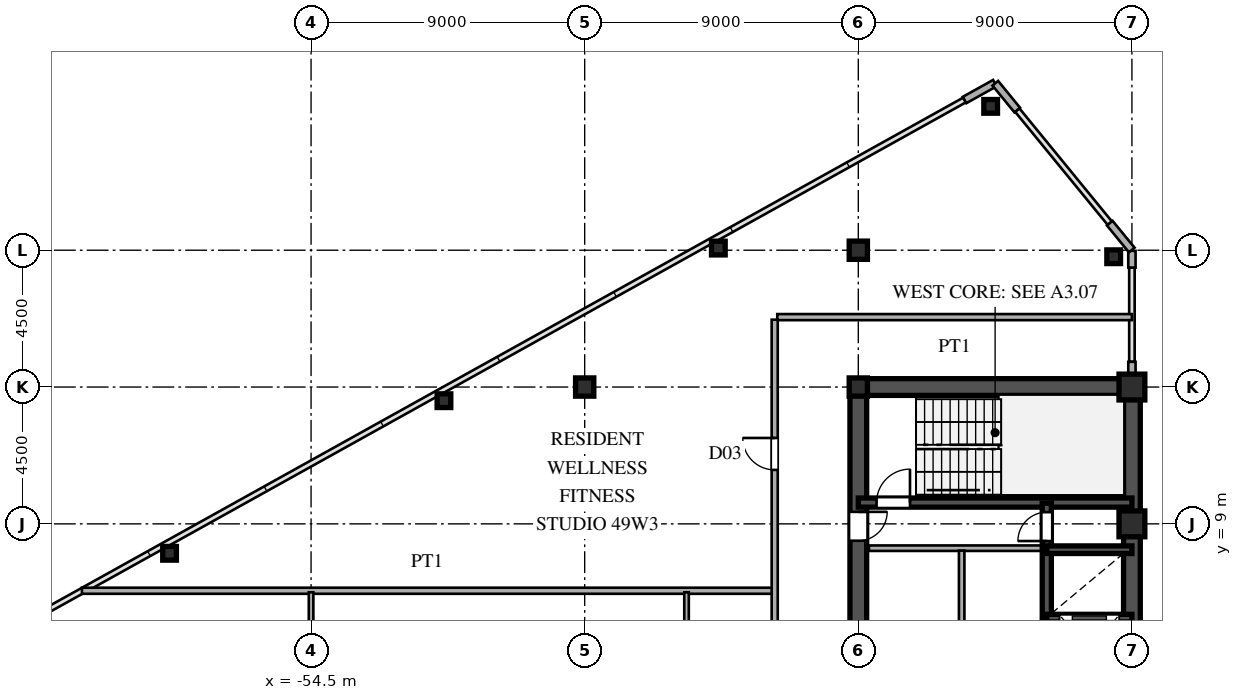
"""IFC4 building model, lengths in metres.
Left out: names, types, materials, properties, quantities, classifications, styles, units other than length and angle.
Written with IfcOpenShell. Run it as: python <this file> out.ifc"""

import sys

from ifc_helpers import new_model, si_unit, direction, frame, frame_2d, origin, origin_2d, place, context, subcontext, project, spatial, rectangle, hollow_rectangle, i_section, extrude, source, transform, mapped, element, fill, save


model = new_model("IFC4")
c1 = context("Model", 3, precision=1e-05, world=origin(), true_north=direction((0.0, 1.0)))
c2 = subcontext(c1, "Body", "Model", "MODEL_VIEW")
j1 = project(units=[si_unit("LENGTHUNIT", "METRE"), si_unit("PLANEANGLEUNIT", "RADIAN")], contexts=[c1])
p1 = place(None, origin())
s1 = spatial("IfcSite", under=j1, at=p1, CompositionType="ELEMENT")
p2 = place(p1, origin())
s2 = spatial("IfcBuilding", under=s1, at=p2, CompositionType="ELEMENT")
p3 = place(p2, frame((0.0, 0.0, 185.1)))
s3 = spatial("IfcBuildingStorey", under=s2, at=p3, CompositionType="ELEMENT", Elevation=185.1)
m1 = source(origin(), c2, "Body", "SweptSolid", [
    extrude(hollow_rectangle(XDim=0.85, YDim=0.85, WallThickness=0.036, at=origin_2d()), origin(), (0.0, 0.0, 1.0), 3.6),
])
for number, where, z_axis, x_axis in (
    (1, (-27.5, 9.0, 0.0), (0.0, 0.0, 1.0), (1.0, 0.0, 0.0)),
    (2, (-27.5, 13.5, 0.0), (0.0, 0.0, 1.0), (1.0, 0.0, 0.0)),
):
    element("IfcColumn", number, at=place(p3, frame(where, z_axis=z_axis, x_axis=x_axis)), inside=s3, PredefinedType="COLUMN", context=c2, shape_type="MappedRepresentation", body=[
        mapped(m1, transform((0.0, 0.0, 0.0), scale=1.0)),
    ])
m2 = source(origin(), c2, "Body", "SweptSolid", [
    extrude(i_section(OverallWidth=0.6, OverallDepth=0.6, WebThickness=0.025, FlangeThickness=0.04, at=origin_2d()), origin(), (0.0, 0.0, 1.0), 3.6),
])
for number, where, z_axis, x_axis in (
    (3, (-36.5, 13.5, 0.0), (0.0, 0.0, 1.0), (1.0, 0.0, 0.0)),
    (4, (-36.5, 18.0, 0.0), (0.0, 0.0, 1.0), (1.0, 0.0, 0.0)),
    (5, (-45.5, 13.5, 0.0), (0.0, 0.0, 1.0), (1.0, 0.0, 0.0)),
):
    element("IfcColumn", number, at=place(p3, frame(where, z_axis=z_axis, x_axis=x_axis)), inside=s3, PredefinedType="COLUMN", context=c2, shape_type="MappedRepresentation", body=[
        mapped(m2, transform((0.0, 0.0, 0.0), scale=1.0)),
    ])
m3 = source(origin(), c2, "Body", "SweptSolid", [
    extrude(hollow_rectangle(XDim=0.45, YDim=0.45, WallThickness=0.018, at=origin_2d()), origin(), (0.0, 0.0, 1.0), 3.6),
])
for number, where, z_axis, x_axis in (
    (6, (-28.1, 17.786, 0.0), (0.0, 0.0, 1.0), (1.0, 0.0, 0.0)),
    (7, (-32.147, 22.732, 0.0), (0.0, 0.0, 1.0), (1.0, 0.0, 0.0)),
    (8, (-41.104, 18.071, 0.0), (0.0, 0.0, 1.0), (1.0, 0.0, 0.0)),
    (9, (-50.129, 13.051, 0.0), (0.0, 0.0, 1.0), (1.0, 0.0, 0.0)),
    (10, (-59.155, 8.031, 0.0), (0.0, 0.0, 1.0), (1.0, 0.0, 0.0)),
):
    element("IfcColumn", number, at=place(p3, frame(where, z_axis=z_axis, x_axis=x_axis)), inside=s3, PredefinedType="COLUMN", context=c2, shape_type="MappedRepresentation", body=[
        mapped(m3, transform((0.0, 0.0, 0.0), scale=1.0)),
    ])
p4 = place(p3, frame((-27.5, 13.78, 0.0), z_axis=(0.0, 0.0, 1.0), x_axis=(0.0, 1.0, 0.0)))
e11 = element("IfcWall", 11, at=p4, inside=s3, PredefinedType="SOLIDWALL", context=c2, shape_type="SweptSolid", body=[
    extrude(rectangle(XDim=0.55, YDim=0.24, at=frame_2d((0.275, 0.0))), origin(), (0.0, 0.0, 1.0), 2.88),
])
p5 = place(p3, frame((-27.5, 17.43, 0.0), z_axis=(0.0, 0.0, 1.0), x_axis=(0.0, 1.0, 0.0)))
e12 = element("IfcWall", 12, at=p5, inside=s3, PredefinedType="SOLIDWALL", context=c2, shape_type="SweptSolid", body=[
    extrude(rectangle(XDim=0.55, YDim=0.24, at=frame_2d((0.275, 0.0))), origin(), (0.0, 0.0, 1.0), 3.38),
])
for number, where, z_axis, x_axis in (
    (13, (-27.506, 18.008, 0.0), (0.0, 0.0, 1.0), (-0.633, 0.774, 0.0)),
    (14, (-31.272, 22.61, 0.0), (0.0, 0.0, 1.0), (-0.633, 0.774, 0.0)),
):
    element("IfcWall", number, at=place(p3, frame(where, z_axis=z_axis, x_axis=x_axis)), inside=s3, PredefinedType="SOLIDWALL", context=c2, shape_type="SweptSolid", body=[
        extrude(rectangle(XDim=1.14, YDim=0.24, at=frame_2d((0.57, 0.0))), origin(), (0.0, 0.0, 1.0), 3.38),
    ])
p6 = place(p3, frame((-32.009, 23.495, 0.0), z_axis=(0.0, 0.0, 1.0), x_axis=(-0.87385402111, -0.486188389196, 0.0)))
e15 = element("IfcWall", 15, at=p6, inside=s3, PredefinedType="SOLIDWALL", context=c2, shape_type="SweptSolid", body=[
    extrude(rectangle(XDim=1.14, YDim=0.24, at=frame_2d((0.57, 0.0))), origin(), (0.0, 0.0, 1.0), 3.38),
])
p7 = place(p3, frame((-27.5, 1.3, 0.0), z_axis=(0.0, 0.0, 1.0), x_axis=(0.0, 1.0, 0.0)))
e16 = element("IfcWall", 16, at=p7, inside=s3, PredefinedType="SHEAR", context=c2, shape_type="SweptSolid", body=[
    extrude(rectangle(XDim=12.2, YDim=0.55, at=frame_2d((6.1, 0.0))), origin(), (0.0, 0.0, 1.0), 3.38),
])
p8 = place(p3, frame((-36.5, 13.5, 0.0), z_axis=(0.0, 0.0, 1.0), x_axis=(1.0, 0.0, 0.0)))
e17 = element("IfcWall", 17, at=p8, inside=s3, PredefinedType="SHEAR", context=c2, shape_type="SweptSolid", body=[
    extrude(rectangle(XDim=9.0, YDim=0.55, at=frame_2d((4.5, 0.0))), origin(), (0.0, 0.0, 1.0), 3.38),
])
p9 = place(p3, frame((-36.5, 8.2, 0.0), z_axis=(0.0, 0.0, 1.0), x_axis=(0.0, 1.0, 0.0)))
e18 = element("IfcWall", 18, at=p9, inside=s3, PredefinedType="SHEAR", context=c2, shape_type="SweptSolid", body=[
    extrude(rectangle(XDim=5.45, YDim=0.55, at=frame_2d((2.725, 0.0))), origin(), (0.0, 0.0, 1.0), 3.38),
])
p10 = place(p9, frame((0.245, 0.0, 0.0)))
e19 = element("IfcOpeningElement", 19, at=p10, cuts=e18, PredefinedType="OPENING", context=c2, shape_type="SweptSolid", body=[
    extrude(rectangle(XDim=0.95, YDim=2.15, at=frame_2d((0.475, 1.075))), frame((0.0, 0.285, 0.0), z_axis=(0.0, -1.0, 0.0), x_axis=(1.0, 0.0, 0.0)), (0.0, 0.0, 1.0), 0.57),
])
p11 = place(p3, frame((-36.5, 1.3, 0.0), z_axis=(0.0, 0.0, 1.0), x_axis=(0.0, 1.0, 0.0)))
e20 = element("IfcWall", 20, at=p11, inside=s3, PredefinedType="SHEAR", context=c2, shape_type="SweptSolid", body=[
    extrude(rectangle(XDim=6.9, YDim=0.55, at=frame_2d((3.45, 0.0))), origin(), (0.0, 0.0, 1.0), 3.38),
])
p12 = place(p11, frame((2.975, 0.0, 0.0)))
e21 = element("IfcOpeningElement", 21, at=p12, cuts=e20, PredefinedType="OPENING", context=c2, shape_type="SweptSolid", body=[
    extrude(rectangle(XDim=0.95, YDim=2.15, at=frame_2d((0.475, 1.075))), frame((0.0, 0.285, 0.0), z_axis=(0.0, -1.0, 0.0), x_axis=(1.0, 0.0, 0.0)), (0.0, 0.0, 1.0), 0.57),
])
p13 = place(p3, frame((-36.5, 9.7, 0.0), z_axis=(0.0, 0.0, 1.0), x_axis=(1.0, 0.0, 0.0)))
e22 = element("IfcWall", 22, at=p13, inside=s3, PredefinedType="SHEAR", context=c2, shape_type="SweptSolid", body=[
    extrude(rectangle(XDim=9.0, YDim=0.3, at=frame_2d((4.5, 0.0))), origin(), (0.0, 0.0, 1.0), 3.38),
])
p14 = place(p13, frame((0.6, 0.0, 0.0)))
e23 = element("IfcOpeningElement", 23, at=p14, cuts=e22, PredefinedType="OPENING", context=c2, shape_type="SweptSolid", body=[
    extrude(rectangle(XDim=1.1, YDim=2.2, at=frame_2d((0.55, 1.1))), frame((0.0, 0.16, 0.0), z_axis=(0.0, -1.0, 0.0), x_axis=(1.0, 0.0, 0.0)), (0.0, 0.0, 1.0), 0.32),
])
for number, where, z_axis, x_axis in (
    (24, (-30.3, 5.9, 0.0), (0.0, 0.0, 1.0), (1.0, 0.0, 0.0)),
    (25, (-30.3, 8.15, 0.0), (0.0, 0.0, 1.0), (1.0, 0.0, 0.0)),
):
    element("IfcWall", number, at=place(p3, frame(where, z_axis=z_axis, x_axis=x_axis)), inside=s3, PredefinedType="SHEAR", context=c2, shape_type="SweptSolid", body=[
        extrude(rectangle(XDim=2.8, YDim=0.25, at=frame_2d((1.4, 0.0))), origin(), (0.0, 0.0, 1.0), 3.38),
    ])
p15 = place(p3, frame((-30.3, 3.6, 0.0), z_axis=(0.0, 0.0, 1.0), x_axis=(0.0, 1.0, 0.0)))
e26 = element("IfcWall", 26, at=p15, inside=s3, PredefinedType="SHEAR", context=c2, shape_type="SweptSolid", body=[
    extrude(rectangle(XDim=2.3, YDim=0.3, at=frame_2d((1.15, 0.0))), origin(), (0.0, 0.0, 1.0), 3.38),
])
p16 = place(p15, frame((0.6, 0.0, 0.0)))
e27 = element("IfcOpeningElement", 27, at=p16, cuts=e26, PredefinedType="OPENING", context=c2, shape_type="SweptSolid", body=[
    extrude(rectangle(XDim=1.1, YDim=2.2, at=frame_2d((0.55, 1.1))), frame((0.0, 0.16, 0.0), z_axis=(0.0, -1.0, 0.0), x_axis=(1.0, 0.0, 0.0)), (0.0, 0.0, 1.0), 0.32),
])
p17 = place(p3, frame((-30.3, 5.9, 0.0), z_axis=(0.0, 0.0, 1.0), x_axis=(0.0, 1.0, 0.0)))
e28 = element("IfcWall", 28, at=p17, inside=s3, PredefinedType="SHEAR", context=c2, shape_type="SweptSolid", body=[
    extrude(rectangle(XDim=2.25, YDim=0.3, at=frame_2d((1.125, 0.0))), origin(), (0.0, 0.0, 1.0), 3.38),
])
p18 = place(p3, frame((-30.3, 8.15, 0.0), z_axis=(0.0, 0.0, 1.0), x_axis=(0.0, 1.0, 0.0)))
e29 = element("IfcWall", 29, at=p18, inside=s3, PredefinedType="SHEAR", context=c2, shape_type="SweptSolid", body=[
    extrude(rectangle(XDim=1.53, YDim=0.3, at=frame_2d((0.765, 0.0))), origin(), (0.0, 0.0, 1.0), 3.38),
])
p19 = place(p18, frame((0.285, 0.0, 0.0)))
e30 = element("IfcOpeningElement", 30, at=p19, cuts=e29, PredefinedType="OPENING", context=c2, shape_type="SweptSolid", body=[
    extrude(rectangle(XDim=0.95, YDim=2.15, at=frame_2d((0.475, 1.075))), frame((0.0, 0.16, 0.0), z_axis=(0.0, -1.0, 0.0), x_axis=(1.0, 0.0, 0.0)), (0.0, 0.0, 1.0), 0.32),
])
p20 = place(p3, frame((-36.15, 8.2, 0.0), z_axis=(0.0, 0.0, 1.0), x_axis=(1.0, 0.0, 0.0)))
e31 = element("IfcWall", 31, at=p20, inside=s3, PredefinedType="PARTITIONING", context=c2, shape_type="SweptSolid", body=[
    extrude(rectangle(XDim=5.7, YDim=0.18, at=frame_2d((2.85, 0.0))), origin(), (0.0, 0.0, 1.0), 3.38),
])
p21 = place(p3, frame((-33.1, 1.38, 0.0), z_axis=(0.0, 0.0, 1.0), x_axis=(0.0, 1.0, 0.0)))
e32 = element("IfcWall", 32, at=p21, inside=s3, PredefinedType="PARTITIONING", context=c2, shape_type="SweptSolid", body=[
    extrude(rectangle(XDim=6.74, YDim=0.18, at=frame_2d((3.37, 0.0))), origin(), (0.0, 0.0, 1.0), 3.38),
])
p22 = place(p3, frame((-62.037, 6.8, 0.0), z_axis=(0.0, 0.0, 1.0), x_axis=(1.0, 0.0, 0.0)))
e33 = element("IfcWall", 33, at=p22, inside=s3, PredefinedType="PARTITIONING", context=c2, shape_type="SweptSolid", body=[
    extrude(rectangle(XDim=22.707, YDim=0.2, at=frame_2d((11.354, 0.0))), origin(), (0.0, 0.0, 1.0), 3.38),
])
p23 = place(p3, frame((-39.165, 15.8, 0.0), z_axis=(0.0, 0.0, 1.0), x_axis=(1.0, 0.0, 0.0)))
e34 = element("IfcWall", 34, at=p23, inside=s3, PredefinedType="PARTITIONING", context=c2, shape_type="SweptSolid", body=[
    extrude(rectangle(XDim=11.665, YDim=0.2, at=frame_2d((5.833, 0.0))), origin(), (0.0, 0.0, 1.0), 3.38),
])
p24 = place(p3, frame((-54.5, -6.75, 0.0), z_axis=(0.0, 0.0, 1.0), x_axis=(0.0, 1.0, 0.0)))
e35 = element("IfcWall", 35, at=p24, inside=s3, PredefinedType="PARTITIONING", context=c2, shape_type="SweptSolid", body=[
    extrude(rectangle(XDim=13.5, YDim=0.15, at=frame_2d((6.75, 0.0))), origin(), (0.0, 0.0, 1.0), 2.78),
])
p25 = place(p24, frame((6.275, 0.0, 0.0)))
e36 = element("IfcOpeningElement", 36, at=p25, cuts=e35, PredefinedType="OPENING", context=c2, shape_type="SweptSolid", body=[
    extrude(rectangle(XDim=0.95, YDim=2.15, at=frame_2d((0.475, 1.075))), frame((0.0, 0.085, 0.0), z_axis=(0.0, -1.0, 0.0), x_axis=(1.0, 0.0, 0.0)), (0.0, 0.0, 1.0), 0.17),
])
p26 = place(p3, frame((-42.15, 2.772, 0.0), z_axis=(0.0, 0.0, 1.0), x_axis=(0.0, 1.0, 0.0)))
e37 = element("IfcWall", 37, at=p26, inside=s3, PredefinedType="PARTITIONING", context=c2, shape_type="SweptSolid", body=[
    extrude(rectangle(XDim=3.978, YDim=0.15, at=frame_2d((1.989, 0.0))), origin(), (0.0, 0.0, 1.0), 3.38),
])
p27 = place(p3, frame((-39.25, -15.715, 0.0), z_axis=(0.0, 0.0, 1.0), x_axis=(0.0, 1.0, 0.0)))
e38 = element("IfcWall", 38, at=p27, inside=s3, PredefinedType="PARTITIONING", context=c2, shape_type="SweptSolid", body=[
    extrude(rectangle(XDim=31.43, YDim=0.2, at=frame_2d((15.715, 0.0))), origin(), (0.0, 0.0, 1.0), 3.38),
])
p28 = place(p27, frame((3.89, 0.0, 0.0)))
e39 = element("IfcOpeningElement", 39, at=p28, cuts=e38, PredefinedType="OPENING", context=c2, shape_type="SweptSolid", body=[
    extrude(rectangle(XDim=1.05, YDim=2.25, at=frame_2d((0.525, 1.125))), frame((0.0, 0.11, 0.0), z_axis=(0.0, -1.0, 0.0), x_axis=(1.0, 0.0, 0.0)), (0.0, 0.0, 1.0), 0.22),
])
p29 = place(p27, frame((14.986, 0.0, 0.0)))
e40 = element("IfcOpeningElement", 40, at=p29, cuts=e38, PredefinedType="OPENING", context=c2, shape_type="SweptSolid", body=[
    extrude(rectangle(XDim=1.05, YDim=2.25, at=frame_2d((0.525, 1.125))), frame((0.0, 0.11, 0.0), z_axis=(0.0, -1.0, 0.0), x_axis=(1.0, 0.0, 0.0)), (0.0, 0.0, 1.0), 0.22),
])
p30 = place(p27, frame((26.49, 0.0, 0.0)))
e41 = element("IfcOpeningElement", 41, at=p30, cuts=e38, PredefinedType="OPENING", context=c2, shape_type="SweptSolid", body=[
    extrude(rectangle(XDim=1.05, YDim=2.25, at=frame_2d((0.525, 1.125))), frame((0.0, 0.11, 0.0), z_axis=(0.0, -1.0, 0.0), x_axis=(1.0, 0.0, 0.0)), (0.0, 0.0, 1.0), 0.22),
])
m4 = source(origin(), c2, "Body", "SweptSolid", [
    extrude(rectangle(XDim=0.95, YDim=2.15, at=frame_2d((0.475, 1.075))), frame((0.0, 0.025, 0.0), z_axis=(0.0, -1.0, 0.0), x_axis=(1.0, 0.0, 0.0)), (0.0, 0.0, 1.0), 0.05),
])
p31 = place(p10, frame((0.95, 0.0, 0.0), z_axis=(0.0, 0.0, 1.0), x_axis=(-1.0, 0.0, 0.0)))
e42 = element("IfcDoor", 42, at=p31, inside=s3, OperationType="SINGLE_SWING_RIGHT", PredefinedType="DOOR", context=c2, shape_type="MappedRepresentation", body=[
    mapped(m4, transform((0.0, 0.0, 0.0), scale=1.0)),
])
fill(e19, e42)
m5 = source(origin(), c2, "Body", "SweptSolid", [
    extrude(rectangle(XDim=1.1, YDim=2.2, at=frame_2d((0.55, 1.1))), frame((0.0, 0.025, 0.0), z_axis=(0.0, -1.0, 0.0), x_axis=(1.0, 0.0, 0.0)), (0.0, 0.0, 1.0), 0.05),
])
p32 = place(p14, origin())
e43 = element("IfcDoor", 43, at=p32, inside=s3, OperationType="SINGLE_SWING_RIGHT", PredefinedType="DOOR", context=c2, shape_type="MappedRepresentation", body=[
    mapped(m5, transform((0.0, 0.0, 0.0), scale=1.0)),
])
fill(e23, e43)
p33 = place(p19, origin())
e44 = element("IfcDoor", 44, at=p33, inside=s3, OperationType="SINGLE_SWING_LEFT", PredefinedType="DOOR", context=c2, shape_type="MappedRepresentation", body=[
    mapped(m4, transform((0.0, 0.0, 0.0), scale=1.0)),
])
fill(e30, e44)
m6 = source(origin(), c2, "Body", "SweptSolid", [
    extrude(rectangle(XDim=1.05, YDim=2.25, at=frame_2d((0.525, 1.125))), frame((0.0, 0.025, 0.0), z_axis=(0.0, -1.0, 0.0), x_axis=(1.0, 0.0, 0.0)), (0.0, 0.0, 1.0), 0.05),
])
p34 = place(p30, origin())
e45 = element("IfcDoor", 45, at=p34, inside=s3, OperationType="SINGLE_SWING_RIGHT", PredefinedType="DOOR", context=c2, shape_type="MappedRepresentation", body=[
    mapped(m6, transform((0.0, 0.0, 0.0), scale=1.0)),
])
fill(e41, e45)
save(model, sys.argv[1])
